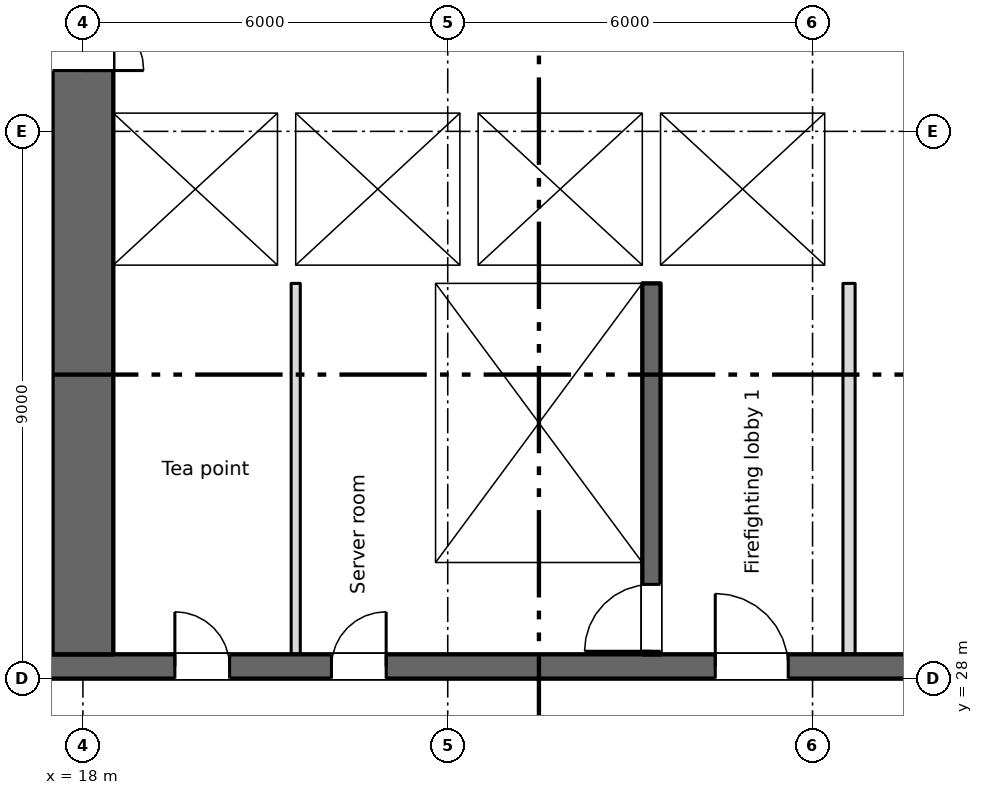
"""IFC4 building model, lengths in metres.
Left out: names, types, materials, properties, quantities, classifications, styles, units other than length and angle.
Written with IfcOpenShell. Run it as: python <this file> out.ifc"""

import sys

from ifc_helpers import new_model, si_unit, direction, frame, frame_2d, origin, place, context, subcontext, project, spatial, rectangle, extrude, element, fill, save


model = new_model("IFC4")
c1 = context("Model", 3, precision=1e-05, world=origin(), true_north=direction((0.0, 1.0)))
c2 = subcontext(c1, "Body", "Model", "MODEL_VIEW")
j1 = project(units=[si_unit("LENGTHUNIT", "METRE"), si_unit("PLANEANGLEUNIT", "RADIAN")], contexts=[c1])
p1 = place(None, origin())
s1 = spatial("IfcSite", under=j1, at=p1, CompositionType="ELEMENT")
p2 = place(p1, origin())
s2 = spatial("IfcBuilding", under=s1, at=p2, CompositionType="ELEMENT")
p3 = place(p2, frame((0.0, 0.0, 86.25)))
s3 = spatial("IfcBuildingStorey", under=s2, at=p3, CompositionType="ELEMENT", Elevation=86.25)
p4 = place(p3, frame((6.7, 28.2, 0.0), z_axis=(0.0, 0.0, 1.0), x_axis=(1.0, 0.0, 0.0)))
e1 = element("IfcWall", 1, at=p4, inside=s3, PredefinedType="SHEAR", context=c2, shape_type="SweptSolid", body=[
    extrude(rectangle(XDim=57.8, YDim=0.4, at=frame_2d((28.9, 0.0))), origin(), (0.0, 0.0, 1.0), 3.15),
])
p5 = place(p4, frame((12.812, 0.0, 0.0)))
e2 = element("IfcOpeningElement", 2, at=p5, cuts=e1, PredefinedType="OPENING", context=c2, shape_type="SweptSolid", body=[
    extrude(rectangle(XDim=0.9, YDim=2.1, at=frame_2d((0.45, 1.05))), frame((0.0, 0.21, 0.0), z_axis=(0.0, -1.0, 0.0), x_axis=(1.0, 0.0, 0.0)), (0.0, 0.0, 1.0), 0.42),
])
p6 = place(p4, frame((15.387, 0.0, 0.0)))
e3 = element("IfcOpeningElement", 3, at=p6, cuts=e1, PredefinedType="OPENING", context=c2, shape_type="SweptSolid", body=[
    extrude(rectangle(XDim=0.9, YDim=2.1, at=frame_2d((0.45, 1.05))), frame((0.0, 0.21, 0.0), z_axis=(0.0, -1.0, 0.0), x_axis=(1.0, 0.0, 0.0)), (0.0, 0.0, 1.0), 0.42),
])
p7 = place(p4, frame((48.312, 0.0, 0.0)))
e4 = element("IfcOpeningElement", 4, at=p7, cuts=e1, PredefinedType="OPENING", context=c2, shape_type="SweptSolid", body=[
    extrude(rectangle(XDim=0.9, YDim=2.1, at=frame_2d((0.45, 1.05))), frame((0.0, 0.21, 0.0), z_axis=(0.0, -1.0, 0.0), x_axis=(1.0, 0.0, 0.0)), (0.0, 0.0, 1.0), 0.42),
])
p8 = place(p4, frame((50.887, 0.0, 0.0)))
e5 = element("IfcOpeningElement", 5, at=p8, cuts=e1, PredefinedType="OPENING", context=c2, shape_type="SweptSolid", body=[
    extrude(rectangle(XDim=0.9, YDim=2.1, at=frame_2d((0.45, 1.05))), frame((0.0, 0.21, 0.0), z_axis=(0.0, -1.0, 0.0), x_axis=(1.0, 0.0, 0.0)), (0.0, 0.0, 1.0), 0.42),
])
p9 = place(p4, frame((0.562, 0.0, 0.0)))
e6 = element("IfcOpeningElement", 6, at=p9, cuts=e1, PredefinedType="OPENING", context=c2, shape_type="SweptSolid", body=[
    extrude(rectangle(XDim=0.9, YDim=2.1, at=frame_2d((0.45, 1.05))), frame((0.0, 0.21, 0.0), z_axis=(0.0, -1.0, 0.0), x_axis=(1.0, 0.0, 0.0)), (0.0, 0.0, 1.0), 0.42),
])
p10 = place(p4, frame((2.137, 0.0, 0.0)))
e7 = element("IfcOpeningElement", 7, at=p10, cuts=e1, PredefinedType="OPENING", context=c2, shape_type="SweptSolid", body=[
    extrude(rectangle(XDim=0.9, YDim=2.1, at=frame_2d((0.45, 1.05))), frame((0.0, 0.21, 0.0), z_axis=(0.0, -1.0, 0.0), x_axis=(1.0, 0.0, 0.0)), (0.0, 0.0, 1.0), 0.42),
])
p11 = place(p4, frame((4.7, 0.0, 0.0)))
e8 = element("IfcOpeningElement", 8, at=p11, cuts=e1, PredefinedType="OPENING", context=c2, shape_type="SweptSolid", body=[
    extrude(rectangle(XDim=1.2, YDim=2.1, at=frame_2d((0.6, 1.05))), frame((0.0, 0.21, 0.0), z_axis=(0.0, -1.0, 0.0), x_axis=(1.0, 0.0, 0.0)), (0.0, 0.0, 1.0), 0.42),
])
p12 = place(p4, frame((31.7, 0.0, 0.0)))
e9 = element("IfcOpeningElement", 9, at=p12, cuts=e1, PredefinedType="OPENING", context=c2, shape_type="SweptSolid", body=[
    extrude(rectangle(XDim=1.2, YDim=2.1, at=frame_2d((0.6, 1.05))), frame((0.0, 0.21, 0.0), z_axis=(0.0, -1.0, 0.0), x_axis=(1.0, 0.0, 0.0)), (0.0, 0.0, 1.0), 0.42),
])
p13 = place(p4, frame((55.2, 0.0, 0.0)))
e10 = element("IfcOpeningElement", 10, at=p13, cuts=e1, PredefinedType="OPENING", context=c2, shape_type="SweptSolid", body=[
    extrude(rectangle(XDim=1.2, YDim=2.1, at=frame_2d((0.6, 1.05))), frame((0.0, 0.21, 0.0), z_axis=(0.0, -1.0, 0.0), x_axis=(1.0, 0.0, 0.0)), (0.0, 0.0, 1.0), 0.42),
])
p14 = place(p4, frame((21.7, 0.0, 0.0)))
e11 = element("IfcOpeningElement", 11, at=p14, cuts=e1, PredefinedType="OPENING", context=c2, shape_type="SweptSolid", body=[
    extrude(rectangle(XDim=1.2, YDim=2.1, at=frame_2d((0.6, 1.05))), frame((0.0, 0.21, 0.0), z_axis=(0.0, -1.0, 0.0), x_axis=(1.0, 0.0, 0.0)), (0.0, 0.0, 1.0), 0.42),
])
p15 = place(p4, frame((41.7, 0.0, 0.0)))
e12 = element("IfcOpeningElement", 12, at=p15, cuts=e1, PredefinedType="OPENING", context=c2, shape_type="SweptSolid", body=[
    extrude(rectangle(XDim=1.2, YDim=2.1, at=frame_2d((0.6, 1.05))), frame((0.0, 0.21, 0.0), z_axis=(0.0, -1.0, 0.0), x_axis=(1.0, 0.0, 0.0)), (0.0, 0.0, 1.0), 0.42),
])
p16 = place(p4, frame((24.85, 0.0, 0.0)))
e13 = element("IfcOpeningElement", 13, at=p16, cuts=e1, PredefinedType="OPENING", context=c2, shape_type="SweptSolid", body=[
    extrude(rectangle(XDim=2.4, YDim=2.1, at=frame_2d((1.2, 1.05))), frame((0.0, 0.21, 0.0), z_axis=(0.0, -1.0, 0.0), x_axis=(1.0, 0.0, 0.0)), (0.0, 0.0, 1.0), 0.42),
])
p17 = place(p4, frame((37.35, 0.0, 0.0)))
e14 = element("IfcOpeningElement", 14, at=p17, cuts=e1, PredefinedType="OPENING", context=c2, shape_type="SweptSolid", body=[
    extrude(rectangle(XDim=2.4, YDim=2.1, at=frame_2d((1.2, 1.05))), frame((0.0, 0.21, 0.0), z_axis=(0.0, -1.0, 0.0), x_axis=(1.0, 0.0, 0.0)), (0.0, 0.0, 1.0), 0.42),
])
p18 = place(p4, frame((7.85, 0.0, 0.0)))
e15 = element("IfcOpeningElement", 15, at=p18, cuts=e1, PredefinedType="OPENING", context=c2, shape_type="SweptSolid", body=[
    extrude(rectangle(XDim=2.4, YDim=2.1, at=frame_2d((1.2, 1.05))), frame((0.0, 0.21, 0.0), z_axis=(0.0, -1.0, 0.0), x_axis=(1.0, 0.0, 0.0)), (0.0, 0.0, 1.0), 0.42),
])
p19 = place(p4, frame((28.85, 0.0, 0.0)))
e16 = element("IfcOpeningElement", 16, at=p19, cuts=e1, PredefinedType="OPENING", context=c2, shape_type="SweptSolid", body=[
    extrude(rectangle(XDim=0.9, YDim=2.1, at=frame_2d((0.45, 1.05))), frame((0.0, 0.21, 0.0), z_axis=(0.0, -1.0, 0.0), x_axis=(1.0, 0.0, 0.0)), (0.0, 0.0, 1.0), 0.42),
])
p20 = place(p4, frame((34.85, 0.0, 0.0)))
e17 = element("IfcOpeningElement", 17, at=p20, cuts=e1, PredefinedType="OPENING", context=c2, shape_type="SweptSolid", body=[
    extrude(rectangle(XDim=0.9, YDim=2.1, at=frame_2d((0.45, 1.05))), frame((0.0, 0.21, 0.0), z_axis=(0.0, -1.0, 0.0), x_axis=(1.0, 0.0, 0.0)), (0.0, 0.0, 1.0), 0.42),
])
p21 = place(p3, frame((18.0, 28.4, 0.0), z_axis=(0.0, 0.0, 1.0), x_axis=(0.0, 1.0, 0.0)))
e18 = element("IfcWall", 18, at=p21, inside=s3, PredefinedType="SHEAR", context=c2, shape_type="SweptSolid", body=[
    extrude(rectangle(XDim=16.6, YDim=1.0, at=frame_2d((8.3, 0.0))), origin(), (0.0, 0.0, 1.0), 3.15),
])
p22 = place(p21, frame((9.6, 0.0, 0.0)))
e19 = element("IfcOpeningElement", 19, at=p22, cuts=e18, PredefinedType="OPENING", context=c2, shape_type="SweptSolid", body=[
    extrude(rectangle(XDim=2.0, YDim=2.1, at=frame_2d((1.0, 1.05))), frame((0.0, 0.51, 0.0), z_axis=(0.0, -1.0, 0.0), x_axis=(1.0, 0.0, 0.0)), (0.0, 0.0, 1.0), 1.02),
])
p23 = place(p21, frame((15.25, 0.0, 0.0)))
e20 = element("IfcOpeningElement", 20, at=p23, cuts=e18, PredefinedType="OPENING", context=c2, shape_type="SweptSolid", body=[
    extrude(rectangle(XDim=1.2, YDim=2.1, at=frame_2d((0.6, 1.05))), frame((0.0, 0.51, 0.0), z_axis=(0.0, -1.0, 0.0), x_axis=(1.0, 0.0, 0.0)), (0.0, 0.0, 1.0), 1.02),
])
p24 = place(p3, frame((23.65, 28.4, 0.0), z_axis=(0.0, 0.0, 1.0), x_axis=(0.0, 1.0, 0.0)))
e21 = element("IfcWall", 21, at=p24, inside=s3, PredefinedType="SHEAR", context=c2, shape_type="SweptSolid", body=[
    extrude(rectangle(XDim=6.1, YDim=0.3, at=frame_2d((3.05, 0.0))), origin(), (0.0, 0.0, 1.0), 3.15),
])
p25 = place(p3, frame((27.35, 28.4, 0.0), z_axis=(0.0, 0.0, 1.0), x_axis=(0.0, 1.0, 0.0)))
e22 = element("IfcWall", 22, at=p25, inside=s3, PredefinedType="SHEAR", context=c2, shape_type="SweptSolid", body=[
    extrude(rectangle(XDim=6.1, YDim=0.3, at=frame_2d((3.05, 0.0))), origin(), (0.0, 0.0, 1.0), 3.15),
])
p26 = place(p25, frame((0.05, 0.0, 0.0)))
e23 = element("IfcOpeningElement", 23, at=p26, cuts=e22, PredefinedType="OPENING", context=c2, shape_type="SweptSolid", body=[
    extrude(rectangle(XDim=1.1, YDim=2.1, at=frame_2d((0.55, 1.05))), frame((0.0, 0.16, 0.0), z_axis=(0.0, -1.0, 0.0), x_axis=(1.0, 0.0, 0.0)), (0.0, 0.0, 1.0), 0.32),
])
p27 = place(p3, frame((18.5, 34.65, 0.0), z_axis=(0.0, 0.0, 1.0), x_axis=(1.0, 0.0, 0.0)))
e24 = element("IfcWall", 24, at=p27, inside=s3, PredefinedType="SHEAR", context=c2, shape_type="SweptSolid", body=[
    extrude(rectangle(XDim=12.2, YDim=0.3, at=frame_2d((6.1, 0.0))), origin(), (0.0, 0.0, 1.0), 3.15),
])
p28 = place(p27, frame((9.8, 0.0, 0.0)))
e25 = element("IfcOpeningElement", 25, at=p28, cuts=e24, PredefinedType="OPENING", context=c2, shape_type="SweptSolid", body=[
    extrude(rectangle(XDim=1.1, YDim=2.1, at=frame_2d((0.55, 1.05))), frame((0.0, 0.16, 0.0), z_axis=(0.0, -1.0, 0.0), x_axis=(1.0, 0.0, 0.0)), (0.0, 0.0, 1.0), 0.32),
])
p29 = place(p3, frame((18.5, 37.45, 0.0), z_axis=(0.0, 0.0, 1.0), x_axis=(1.0, 0.0, 0.0)))
e26 = element("IfcWall", 26, at=p29, inside=s3, PredefinedType="SHEAR", context=c2, shape_type="SweptSolid", body=[
    extrude(rectangle(XDim=12.2, YDim=0.3, at=frame_2d((6.1, 0.0))), origin(), (0.0, 0.0, 1.0), 3.15),
])
p30 = place(p29, frame((0.8, 0.0, 0.0)))
e27 = element("IfcOpeningElement", 27, at=p30, cuts=e26, PredefinedType="OPENING", context=c2, shape_type="SweptSolid", body=[
    extrude(rectangle(XDim=1.1, YDim=2.1, at=frame_2d((0.55, 1.05))), frame((0.0, 0.16, 0.0), z_axis=(0.0, -1.0, 0.0), x_axis=(1.0, 0.0, 0.0)), (0.0, 0.0, 1.0), 0.32),
])
p31 = place(p29, frame((3.8, 0.0, 0.0)))
e28 = element("IfcOpeningElement", 28, at=p31, cuts=e26, PredefinedType="OPENING", context=c2, shape_type="SweptSolid", body=[
    extrude(rectangle(XDim=1.1, YDim=2.1, at=frame_2d((0.55, 1.05))), frame((0.0, 0.16, 0.0), z_axis=(0.0, -1.0, 0.0), x_axis=(1.0, 0.0, 0.0)), (0.0, 0.0, 1.0), 0.32),
])
p32 = place(p29, frame((6.8, 0.0, 0.0)))
e29 = element("IfcOpeningElement", 29, at=p32, cuts=e26, PredefinedType="OPENING", context=c2, shape_type="SweptSolid", body=[
    extrude(rectangle(XDim=1.1, YDim=2.1, at=frame_2d((0.55, 1.05))), frame((0.0, 0.16, 0.0), z_axis=(0.0, -1.0, 0.0), x_axis=(1.0, 0.0, 0.0)), (0.0, 0.0, 1.0), 0.32),
])
p33 = place(p3, frame((27.35, 34.8, 0.0), z_axis=(0.0, 0.0, 1.0), x_axis=(0.0, 1.0, 0.0)))
e30 = element("IfcWall", 30, at=p33, inside=s3, PredefinedType="SHEAR", context=c2, shape_type="SweptSolid", body=[
    extrude(rectangle(XDim=2.5, YDim=0.3, at=frame_2d((1.25, 0.0))), origin(), (0.0, 0.0, 1.0), 3.15),
])
p34 = place(p3, frame((30.45, 34.8, 0.0), z_axis=(0.0, 0.0, 1.0), x_axis=(0.0, 1.0, 0.0)))
e31 = element("IfcWall", 31, at=p34, inside=s3, PredefinedType="SHEAR", context=c2, shape_type="SweptSolid", body=[
    extrude(rectangle(XDim=2.5, YDim=0.5, at=frame_2d((1.25, 0.0))), origin(), (0.0, 0.0, 1.0), 3.15),
])
for number, where, z_axis, x_axis in (
    (32, (21.35, 34.8, 0.0), (0.0, 0.0, 1.0), (0.0, 1.0, 0.0)),
    (33, (24.35, 34.8, 0.0), (0.0, 0.0, 1.0), (0.0, 1.0, 0.0)),
):
    element("IfcWall", number, at=place(p3, frame(where, z_axis=z_axis, x_axis=x_axis)), inside=s3, PredefinedType="SHEAR", context=c2, shape_type="SweptSolid", body=[
        extrude(rectangle(XDim=2.5, YDim=0.3, at=frame_2d((1.25, 0.0))), origin(), (0.0, 0.0, 1.0), 3.15),
    ])
p35 = place(p3, frame((30.6, 28.4, 0.0), z_axis=(0.0, 0.0, 1.0), x_axis=(0.0, 1.0, 0.0)))
e34 = element("IfcWall", 34, at=p35, inside=s3, PredefinedType="PARTITIONING", context=c2, shape_type="SweptSolid", body=[
    extrude(rectangle(XDim=6.1, YDim=0.2, at=frame_2d((3.05, 0.0))), origin(), (0.0, 0.0, 1.0), 3.15),
])
p36 = place(p3, frame((21.5, 28.4, 0.0), z_axis=(0.0, 0.0, 1.0), x_axis=(0.0, 1.0, 0.0)))
e35 = element("IfcWall", 35, at=p36, inside=s3, PredefinedType="PARTITIONING", context=c2, shape_type="SweptSolid", body=[
    extrude(rectangle(XDim=6.1, YDim=0.15, at=frame_2d((3.05, 0.0))), origin(), (0.0, 0.0, 1.0), 3.15),
])
p37 = place(p5, origin())
e36 = element("IfcDoor", 36, at=p37, inside=s3, OperationType="SINGLE_SWING_LEFT", PredefinedType="DOOR", context=c2, shape_type="SweptSolid", body=[
    extrude(rectangle(XDim=0.9, YDim=2.1, at=frame_2d((0.45, 1.05))), frame((0.0, 0.025, 0.0), z_axis=(0.0, -1.0, 0.0), x_axis=(1.0, 0.0, 0.0)), (0.0, 0.0, 1.0), 0.05),
])
fill(e2, e36)
p38 = place(p6, origin())
e37 = element("IfcDoor", 37, at=p38, inside=s3, OperationType="SINGLE_SWING_RIGHT", PredefinedType="DOOR", context=c2, shape_type="SweptSolid", body=[
    extrude(rectangle(XDim=0.9, YDim=2.1, at=frame_2d((0.45, 1.05))), frame((0.0, 0.025, 0.0), z_axis=(0.0, -1.0, 0.0), x_axis=(1.0, 0.0, 0.0)), (0.0, 0.0, 1.0), 0.05),
])
fill(e3, e37)
p39 = place(p30, origin())
e38 = element("IfcDoor", 38, at=p39, inside=s3, OperationType="SLIDING_TO_LEFT", PredefinedType="DOOR", context=c2, shape_type="SweptSolid", body=[
    extrude(rectangle(XDim=1.1, YDim=2.1, at=frame_2d((0.55, 1.05))), frame((0.0, 0.025, 0.0), z_axis=(0.0, -1.0, 0.0), x_axis=(1.0, 0.0, 0.0)), (0.0, 0.0, 1.0), 0.05),
])
fill(e27, e38)
p40 = place(p31, origin())
e39 = element("IfcDoor", 39, at=p40, inside=s3, OperationType="SLIDING_TO_LEFT", PredefinedType="DOOR", context=c2, shape_type="SweptSolid", body=[
    extrude(rectangle(XDim=1.1, YDim=2.1, at=frame_2d((0.55, 1.05))), frame((0.0, 0.025, 0.0), z_axis=(0.0, -1.0, 0.0), x_axis=(1.0, 0.0, 0.0)), (0.0, 0.0, 1.0), 0.05),
])
fill(e28, e39)
p41 = place(p32, origin())
e40 = element("IfcDoor", 40, at=p41, inside=s3, OperationType="SLIDING_TO_LEFT", PredefinedType="DOOR", context=c2, shape_type="SweptSolid", body=[
    extrude(rectangle(XDim=1.1, YDim=2.1, at=frame_2d((0.55, 1.05))), frame((0.0, 0.025, 0.0), z_axis=(0.0, -1.0, 0.0), x_axis=(1.0, 0.0, 0.0)), (0.0, 0.0, 1.0), 0.05),
])
fill(e29, e40)
p42 = place(p28, origin())
e41 = element("IfcDoor", 41, at=p42, inside=s3, OperationType="SLIDING_TO_LEFT", PredefinedType="DOOR", context=c2, shape_type="SweptSolid", body=[
    extrude(rectangle(XDim=1.1, YDim=2.1, at=frame_2d((0.55, 1.05))), frame((0.0, 0.025, 0.0), z_axis=(0.0, -1.0, 0.0), x_axis=(1.0, 0.0, 0.0)), (0.0, 0.0, 1.0), 0.05),
])
fill(e25, e41)
p43 = place(p26, origin())
e42 = element("IfcDoor", 42, at=p43, inside=s3, OperationType="SINGLE_SWING_LEFT", PredefinedType="DOOR", context=c2, shape_type="SweptSolid", body=[
    extrude(rectangle(XDim=1.1, YDim=2.1, at=frame_2d((0.55, 1.05))), frame((0.0, 0.025, 0.0), z_axis=(0.0, -1.0, 0.0), x_axis=(1.0, 0.0, 0.0)), (0.0, 0.0, 1.0), 0.05),
])
fill(e23, e42)
p44 = place(p14, origin())
e43 = element("IfcDoor", 43, at=p44, inside=s3, OperationType="SINGLE_SWING_LEFT", PredefinedType="DOOR", context=c2, shape_type="SweptSolid", body=[
    extrude(rectangle(XDim=1.2, YDim=2.1, at=frame_2d((0.6, 1.05))), frame((0.0, 0.025, 0.0), z_axis=(0.0, -1.0, 0.0), x_axis=(1.0, 0.0, 0.0)), (0.0, 0.0, 1.0), 0.05),
])
fill(e11, e43)
p45 = place(p22, origin())
e44 = element("IfcDoor", 44, at=p45, inside=s3, OperationType="DOUBLE_DOOR_SINGLE_SWING", PredefinedType="DOOR", context=c2, shape_type="SweptSolid", body=[
    extrude(rectangle(XDim=2.0, YDim=2.1, at=frame_2d((1.0, 1.05))), frame((0.0, 0.025, 0.0), z_axis=(0.0, -1.0, 0.0), x_axis=(1.0, 0.0, 0.0)), (0.0, 0.0, 1.0), 0.05),
])
fill(e19, e44)
save(model, sys.argv[1])
